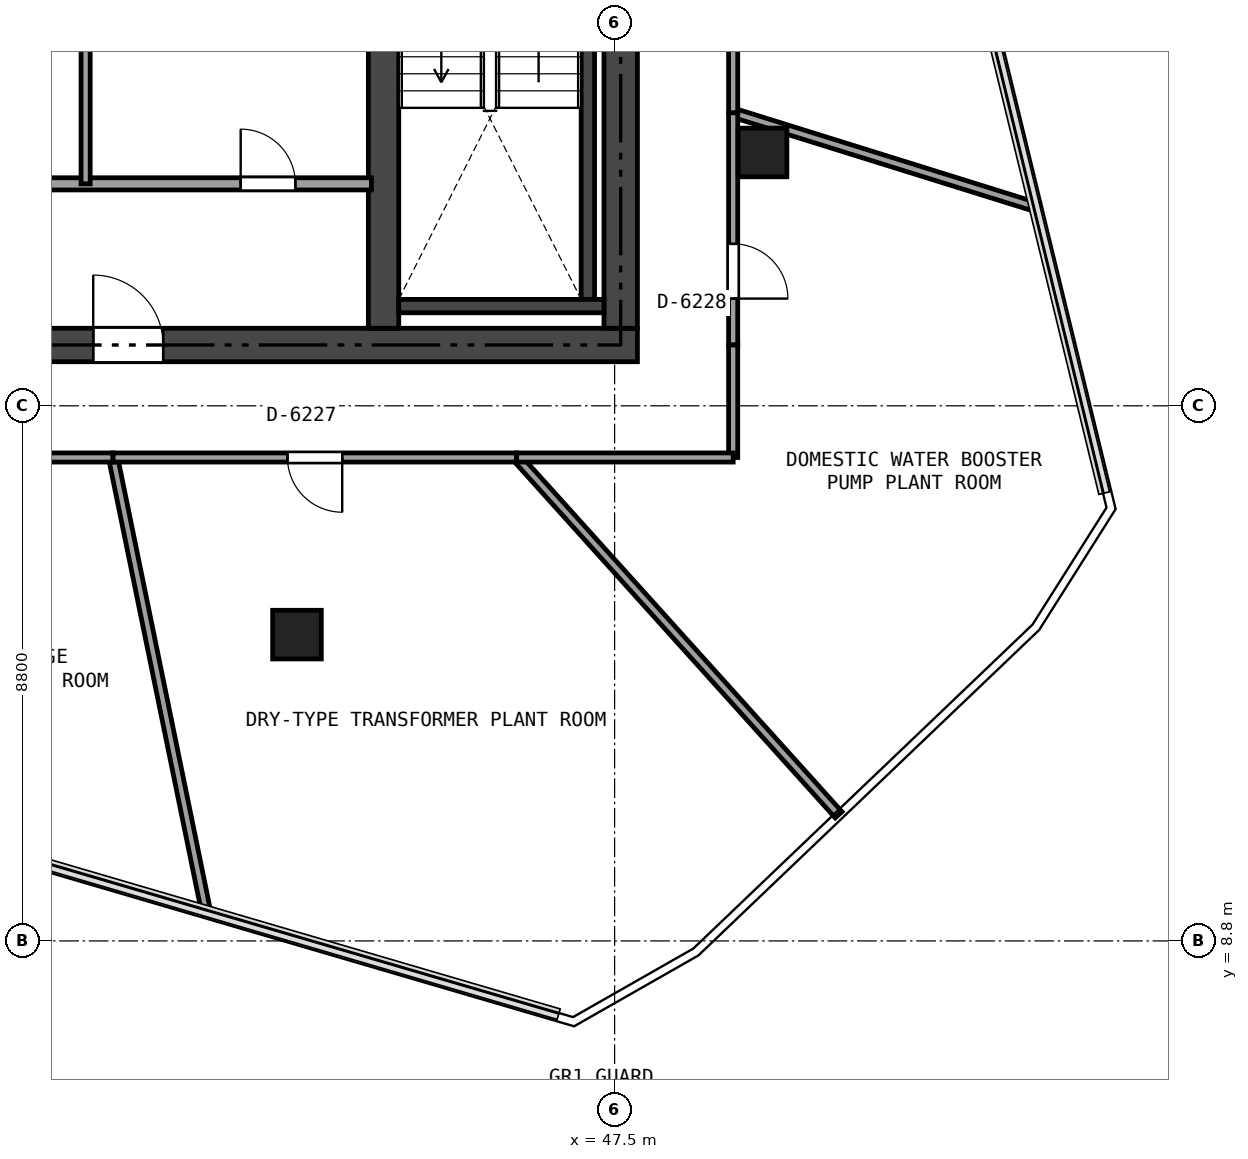
"""IFC4 building model, lengths in metres.
Left out: names, types, materials, properties, quantities, classifications, styles, units other than length and angle.
Written with IfcOpenShell. Run it as: python <this file> out.ifc"""

import sys

from ifc_helpers import new_model, si_unit, direction, frame, frame_2d, origin, origin_2d, place, context, subcontext, project, spatial, rectangle, extrude, element, fill, save


model = new_model("IFC4")
c1 = context("Model", 3, precision=1e-05, world=origin(), true_north=direction((0.0, 1.0)))
c2 = subcontext(c1, "Body", "Model", "MODEL_VIEW")
j1 = project(units=[si_unit("LENGTHUNIT", "METRE"), si_unit("PLANEANGLEUNIT", "RADIAN")], contexts=[c1])
p1 = place(None, origin())
s1 = spatial("IfcSite", under=j1, at=p1, CompositionType="ELEMENT")
p2 = place(p1, origin())
s2 = spatial("IfcBuilding", under=s1, at=p2, CompositionType="ELEMENT")
p3 = place(p2, frame((0.0, 0.0, 231.9)))
s3 = spatial("IfcBuildingStorey", under=s2, at=p3, CompositionType="ELEMENT", Elevation=231.9)
p4 = place(p3, frame((26.525, 18.6, 0.0), z_axis=(0.0, 0.0, 1.0), x_axis=(1.0, 0.0, 0.0)))
e1 = element("IfcWall", 1, at=p4, inside=s3, PredefinedType="SHEAR", context=c2, shape_type="SweptSolid", body=[
    extrude(rectangle(XDim=21.35, YDim=0.55, at=frame_2d((10.675, 0.0))), origin(), (0.0, 0.0, 1.0), 3.18),
])
p5 = place(p4, frame((12.4, 0.0, 0.0)))
e2 = element("IfcOpeningElement", 2, at=p5, cuts=e1, PredefinedType="OPENING", context=c2, shape_type="SweptSolid", body=[
    extrude(rectangle(XDim=1.15, YDim=2.15, at=frame_2d((0.575, 1.075))), frame((0.0, 0.285, 0.0), z_axis=(0.0, -1.0, 0.0), x_axis=(1.0, 0.0, 0.0)), (0.0, 0.0, 1.0), 0.57),
])
p6 = place(p4, frame((5.225, 0.0, 0.0)))
e3 = element("IfcOpeningElement", 3, at=p6, cuts=e1, PredefinedType="OPENING", context=c2, shape_type="SweptSolid", body=[
    extrude(rectangle(XDim=0.9, YDim=2.1, at=frame_2d((0.45, 1.05))), frame((0.0, 0.285, 0.0), z_axis=(0.0, -1.0, 0.0), x_axis=(1.0, 0.0, 0.0)), (0.0, 0.0, 1.0), 0.57),
])
p7 = place(p3, frame((47.6, 18.875, 0.0), z_axis=(0.0, 0.0, 1.0), x_axis=(0.0, 1.0, 0.0)))
e4 = element("IfcWall", 4, at=p7, inside=s3, PredefinedType="SHEAR", context=c2, shape_type="SweptSolid", body=[
    extrude(rectangle(XDim=15.05, YDim=0.55, at=frame_2d((7.525, 0.0))), origin(), (0.0, 0.0, 1.0), 3.18),
])
p8 = place(p7, frame((6.625, 0.0, 0.0)))
e5 = element("IfcOpeningElement", 5, at=p8, cuts=e4, PredefinedType="OPENING", context=c2, shape_type="SweptSolid", body=[
    extrude(rectangle(XDim=1.1, YDim=2.15, at=frame_2d((0.55, 1.075))), frame((0.0, 0.285, 0.0), z_axis=(0.0, -1.0, 0.0), x_axis=(1.0, 0.0, 0.0)), (0.0, 0.0, 1.0), 0.57),
])
p9 = place(p7, frame((8.525, 0.0, 0.0)))
e6 = element("IfcOpeningElement", 6, at=p9, cuts=e4, PredefinedType="OPENING", context=c2, shape_type="SweptSolid", body=[
    extrude(rectangle(XDim=0.9, YDim=2.1, at=frame_2d((0.45, 1.05))), frame((0.0, 0.285, 0.0), z_axis=(0.0, -1.0, 0.0), x_axis=(1.0, 0.0, 0.0)), (0.0, 0.0, 1.0), 0.57),
])
p10 = place(p7, frame((13.175, 0.0, 0.0)))
e7 = element("IfcOpeningElement", 7, at=p10, cuts=e4, PredefinedType="OPENING", context=c2, shape_type="SweptSolid", body=[
    extrude(rectangle(XDim=0.9, YDim=2.1, at=frame_2d((0.45, 1.05))), frame((0.0, 0.285, 0.0), z_axis=(0.0, -1.0, 0.0), x_axis=(1.0, 0.0, 0.0)), (0.0, 0.0, 1.0), 0.57),
])
p11 = place(p3, frame((43.7, 18.875, 0.0), z_axis=(0.0, 0.0, 1.0), x_axis=(0.0, 1.0, 0.0)))
e8 = element("IfcWall", 8, at=p11, inside=s3, PredefinedType="SHEAR", context=c2, shape_type="SweptSolid", body=[
    extrude(rectangle(XDim=15.05, YDim=0.5, at=frame_2d((7.525, 0.0))), origin(), (0.0, 0.0, 1.0), 3.18),
])
p12 = place(p11, frame((8.125, 0.0, 0.0)))
e9 = element("IfcOpeningElement", 9, at=p12, cuts=e8, PredefinedType="OPENING", context=c2, shape_type="SweptSolid", body=[
    extrude(rectangle(XDim=0.9, YDim=2.1, at=frame_2d((0.45, 1.05))), frame((0.0, 0.26, 0.0), z_axis=(0.0, -1.0, 0.0), x_axis=(1.0, 0.0, 0.0)), (0.0, 0.0, 1.0), 0.52),
])
p13 = place(p3, frame((47.06, 19.35, 0.0), z_axis=(0.0, 0.0, 1.0), x_axis=(0.0, 1.0, 0.0)))
e10 = element("IfcWall", 10, at=p13, inside=s3, PredefinedType="SHEAR", context=c2, shape_type="SweptSolid", body=[
    extrude(rectangle(XDim=5.9, YDim=0.22, at=frame_2d((2.95, 0.0))), origin(), (0.0, 0.0, 1.0), 3.18),
])
p14 = place(p3, frame((43.95, 19.24, 0.0), z_axis=(0.0, 0.0, 1.0), x_axis=(1.0, 0.0, 0.0)))
e11 = element("IfcWall", 11, at=p14, inside=s3, PredefinedType="SHEAR", context=c2, shape_type="SweptSolid", body=[
    extrude(rectangle(XDim=3.375, YDim=0.22, at=frame_2d((1.688, 0.0))), origin(), (0.0, 0.0, 1.0), 3.18),
])
for number, where, z_axis, x_axis in (
    (12, (42.276, 13.837, 0.0), (0.0, 0.0, 1.0), (1.0, 0.0, 0.0)),
    (13, (49.933, 21.766, 0.0), (0.0, 0.0, 1.0), (1.0, 0.0, 0.0)),
):
    element("IfcColumn", number, at=place(p3, frame(where, z_axis=z_axis, x_axis=x_axis)), inside=s3, PredefinedType="COLUMN", context=c2, shape_type="SweptSolid", body=[
        extrude(rectangle(XDim=0.8, YDim=0.8, at=origin_2d()), origin(), (0.0, 0.0, 1.0), 3.18),
    ])
p15 = place(p3, frame((35.62, 21.25, 0.0), z_axis=(0.0, 0.0, 1.0), x_axis=(1.0, 0.0, 0.0)))
e14 = element("IfcWall", 14, at=p15, inside=s3, PredefinedType="SOLIDWALL", context=c2, shape_type="SweptSolid", body=[
    extrude(rectangle(XDim=7.88, YDim=0.2, at=frame_2d((3.94, 0.0))), origin(), (0.0, 0.0, 1.0), 3.18),
])
p16 = place(p15, frame((1.13, 0.0, 0.0)))
e15 = element("IfcOpeningElement", 15, at=p16, cuts=e14, PredefinedType="OPENING", context=c2, shape_type="SweptSolid", body=[
    extrude(rectangle(XDim=0.9, YDim=2.1, at=frame_2d((0.45, 1.05))), frame((0.0, 0.11, 0.0), z_axis=(0.0, -1.0, 0.0), x_axis=(1.0, 0.0, 0.0)), (0.0, 0.0, 1.0), 0.22),
])
p17 = place(p15, frame((5.73, 0.0, 0.0)))
e16 = element("IfcOpeningElement", 16, at=p17, cuts=e14, PredefinedType="OPENING", context=c2, shape_type="SweptSolid", body=[
    extrude(rectangle(XDim=0.9, YDim=2.1, at=frame_2d((0.45, 1.05))), frame((0.0, 0.11, 0.0), z_axis=(0.0, -1.0, 0.0), x_axis=(1.0, 0.0, 0.0)), (0.0, 0.0, 1.0), 0.22),
])
p18 = place(p3, frame((38.8, 21.25, 0.0), z_axis=(0.0, 0.0, 1.0), x_axis=(0.0, 1.0, 0.0)))
e17 = element("IfcWall", 17, at=p18, inside=s3, PredefinedType="PARTITIONING", context=c2, shape_type="SweptSolid", body=[
    extrude(rectangle(XDim=2.4, YDim=0.15, at=frame_2d((1.2, 0.0))), origin(), (0.0, 0.0, 1.0), 2.701),
])
p19 = place(p3, frame((40.79, 9.239, 0.0), z_axis=(0.0, 0.0, 1.0), x_axis=(-0.200737291339, 0.979645109142, 0.0)))
e18 = element("IfcWall", 18, at=p19, inside=s3, PredefinedType="PARTITIONING", context=c2, shape_type="SweptSolid", body=[
    extrude(rectangle(XDim=7.667, YDim=0.15, at=frame_2d((3.833, 0.0))), origin(), (0.0, 0.0, 1.0), 2.705),
])
p20 = place(p3, frame((39.251, 16.75, 0.0), z_axis=(0.0, 0.0, 1.0), x_axis=(-1.0, 0.0, 0.0)))
e19 = element("IfcWall", 19, at=p20, inside=s3, PredefinedType="PARTITIONING", context=c2, shape_type="SweptSolid", body=[
    extrude(rectangle(XDim=5.186, YDim=0.15, at=frame_2d((2.593, 0.0))), origin(), (0.0, 0.0, 1.0), 2.625),
])
p21 = place(p20, frame((2.143, 0.0, 0.0)))
e20 = element("IfcOpeningElement", 20, at=p21, cuts=e19, PredefinedType="OPENING", context=c2, shape_type="SweptSolid", body=[
    extrude(rectangle(XDim=0.9, YDim=2.0, at=frame_2d((0.45, 1.0))), frame((0.0, 0.085, 0.0), z_axis=(0.0, -1.0, 0.0), x_axis=(1.0, 0.0, 0.0)), (0.0, 0.0, 1.0), 0.17),
])
p22 = place(p3, frame((51.184, 10.874, 0.0), z_axis=(0.0, 0.0, 1.0), x_axis=(-0.669438660115, 0.742867336975, 0.0)))
e21 = element("IfcWall", 21, at=p22, inside=s3, PredefinedType="PARTITIONING", context=c2, shape_type="SweptSolid", body=[
    extrude(rectangle(XDim=7.91, YDim=0.15, at=frame_2d((3.955, 0.0))), origin(), (0.0, 0.0, 1.0), 3.18),
])
p23 = place(p3, frame((45.889, 16.75, 0.0), z_axis=(0.0, 0.0, 1.0), x_axis=(-1.0, 0.0, 0.0)))
e22 = element("IfcWall", 22, at=p23, inside=s3, PredefinedType="PARTITIONING", context=c2, shape_type="SweptSolid", body=[
    extrude(rectangle(XDim=6.638, YDim=0.15, at=frame_2d((3.319, 0.0))), origin(), (0.0, 0.0, 1.0), 2.625),
])
p24 = place(p23, frame((2.869, 0.0, 0.0)))
e23 = element("IfcOpeningElement", 23, at=p24, cuts=e22, PredefinedType="OPENING", context=c2, shape_type="SweptSolid", body=[
    extrude(rectangle(XDim=0.9, YDim=2.0, at=frame_2d((0.45, 1.0))), frame((0.0, 0.085, 0.0), z_axis=(0.0, -1.0, 0.0), x_axis=(1.0, 0.0, 0.0)), (0.0, 0.0, 1.0), 0.17),
])
p25 = place(p3, frame((54.464, 20.857, 0.0), z_axis=(0.0, 0.0, 1.0), x_axis=(-0.954693131117, 0.297592045253, 0.0)))
e24 = element("IfcWall", 24, at=p25, inside=s3, PredefinedType="PARTITIONING", context=c2, shape_type="SweptSolid", body=[
    extrude(rectangle(XDim=5.252, YDim=0.15, at=frame_2d((2.626, 0.0))), origin(), (0.0, 0.0, 1.0), 2.705),
])
p26 = place(p3, frame((49.45, 22.42, 0.0), z_axis=(0.0, 0.0, 1.0), x_axis=(0.0, -1.0, 0.0)))
e25 = element("IfcWall", 25, at=p26, inside=s3, PredefinedType="PARTITIONING", context=c2, shape_type="SweptSolid", body=[
    extrude(rectangle(XDim=3.82, YDim=0.15, at=frame_2d((1.91, 0.0))), origin(), (0.0, 0.0, 1.0), 2.625),
])
p27 = place(p26, frame((2.157, 0.0, 0.0)))
e26 = element("IfcOpeningElement", 26, at=p27, cuts=e25, PredefinedType="OPENING", context=c2, shape_type="SweptSolid", body=[
    extrude(rectangle(XDim=0.9, YDim=2.0, at=frame_2d((0.45, 1.0))), frame((0.0, 0.085, 0.0), z_axis=(0.0, -1.0, 0.0), x_axis=(1.0, 0.0, 0.0)), (0.0, 0.0, 1.0), 0.17),
])
p28 = place(p3, frame((49.45, 18.6, 0.0), z_axis=(0.0, 0.0, 1.0), x_axis=(0.0, -1.0, 0.0)))
e27 = element("IfcWall", 27, at=p28, inside=s3, PredefinedType="PARTITIONING", context=c2, shape_type="SweptSolid", body=[
    extrude(rectangle(XDim=1.85, YDim=0.15, at=frame_2d((0.925, 0.0))), origin(), (0.0, 0.0, 1.0), 3.18),
])
p29 = place(p3, frame((49.45, 16.75, 0.0), z_axis=(0.0, 0.0, 1.0), x_axis=(-1.0, 0.0, 0.0)))
e28 = element("IfcWall", 28, at=p29, inside=s3, PredefinedType="PARTITIONING", context=c2, shape_type="SweptSolid", body=[
    extrude(rectangle(XDim=3.561, YDim=0.15, at=frame_2d((1.781, 0.0))), origin(), (0.0, 0.0, 1.0), 3.18),
])
p30 = place(p3, frame((49.45, 29.004, 0.0), z_axis=(0.0, 0.0, 1.0), x_axis=(0.0, -1.0, 0.0)))
e29 = element("IfcWall", 29, at=p30, inside=s3, PredefinedType="PARTITIONING", context=c2, shape_type="SweptSolid", body=[
    extrude(rectangle(XDim=6.584, YDim=0.15, at=frame_2d((3.292, 0.0))), origin(), (0.0, 0.0, 1.0), 2.625),
])
p31 = place(p30, frame((2.842, 0.0, 0.0)))
e30 = element("IfcOpeningElement", 30, at=p31, cuts=e29, PredefinedType="OPENING", context=c2, shape_type="SweptSolid", body=[
    extrude(rectangle(XDim=0.9, YDim=2.0, at=frame_2d((0.45, 1.0))), frame((0.0, 0.085, 0.0), z_axis=(0.0, -1.0, 0.0), x_axis=(1.0, 0.0, 0.0)), (0.0, 0.0, 1.0), 0.17),
])
p32 = place(p5, origin())
e31 = element("IfcDoor", 31, at=p32, inside=s3, OperationType="SINGLE_SWING_LEFT", PredefinedType="DOOR", context=c2, shape_type="SweptSolid", body=[
    extrude(rectangle(XDim=1.15, YDim=2.15, at=frame_2d((0.575, 1.075))), frame((0.0, 0.025, 0.0), z_axis=(0.0, -1.0, 0.0), x_axis=(1.0, 0.0, 0.0)), (0.0, 0.0, 1.0), 0.05),
])
fill(e2, e31)
p33 = place(p17, origin())
e32 = element("IfcDoor", 32, at=p33, inside=s3, OperationType="SINGLE_SWING_LEFT", PredefinedType="DOOR", context=c2, shape_type="SweptSolid", body=[
    extrude(rectangle(XDim=0.9, YDim=2.1, at=frame_2d((0.45, 1.05))), frame((0.0, 0.025, 0.0), z_axis=(0.0, -1.0, 0.0), x_axis=(1.0, 0.0, 0.0)), (0.0, 0.0, 1.0), 0.05),
])
fill(e16, e32)
p34 = place(p24, origin())
e33 = element("IfcDoor", 33, at=p34, inside=s3, OperationType="SINGLE_SWING_LEFT", PredefinedType="DOOR", context=c2, shape_type="SweptSolid", body=[
    extrude(rectangle(XDim=0.9, YDim=2.0, at=frame_2d((0.45, 1.0))), frame((0.0, 0.025, 0.0), z_axis=(0.0, -1.0, 0.0), x_axis=(1.0, 0.0, 0.0)), (0.0, 0.0, 1.0), 0.05),
])
fill(e23, e33)
p35 = place(p27, origin())
e34 = element("IfcDoor", 34, at=p35, inside=s3, OperationType="SINGLE_SWING_RIGHT", PredefinedType="DOOR", context=c2, shape_type="SweptSolid", body=[
    extrude(rectangle(XDim=0.9, YDim=2.0, at=frame_2d((0.45, 1.0))), frame((0.0, 0.025, 0.0), z_axis=(0.0, -1.0, 0.0), x_axis=(1.0, 0.0, 0.0)), (0.0, 0.0, 1.0), 0.05),
])
fill(e26, e34)
save(model, sys.argv[1])
